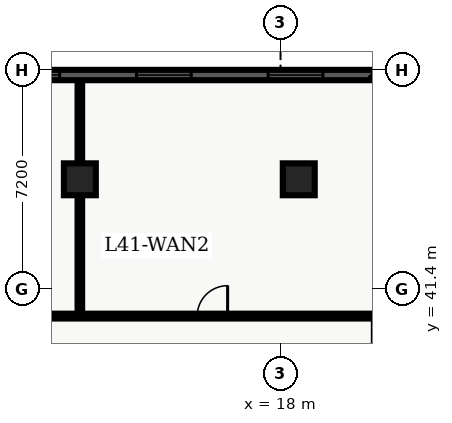
"""IFC4 building model, lengths in metres.
Left out: names, types, materials, properties, quantities, classifications, styles, units other than length and angle.
Written with IfcOpenShell. Run it as: python <this file> out.ifc"""

import sys

from ifc_helpers import new_model, entity, si_unit, converted_unit, direction, frame, origin_with_axes, origin_2d_with_axis, place, context, subcontext, project, spatial, polyline, rectangle, outline, extrude, element, fill, save


model = new_model("IFC4")
c1 = context("Model", 3, precision=1e-05, world=origin_with_axes(), true_north=direction((0.0, 1.0)))
c2 = subcontext(c1, "Body", "Model", "MODEL_VIEW")
j1 = project(units=[si_unit("LENGTHUNIT", "METRE"), converted_unit("PLANEANGLEUNIT", "DEGREE", entity("IfcPlaneAngleMeasure", 0.017), si_unit("PLANEANGLEUNIT", "RADIAN"), dimensions=[0, 0, 0, 0, 0, 0, 0])], contexts=[c1])
p1 = place(None, origin_with_axes())
s1 = spatial("IfcSite", under=j1, at=p1, CompositionType="ELEMENT")
p2 = place(p1, origin_with_axes())
s2 = spatial("IfcBuilding", under=s1, at=p2, CompositionType="ELEMENT")
p3 = place(p2, frame((0.0, 0.0, 168.0), z_axis=(0.0, 0.0, 1.0), x_axis=(1.0, 0.0, 0.0)))
s3 = spatial("IfcBuildingStorey", under=s2, at=p3, CompositionType="ELEMENT", Elevation=168.0)
for number, where, z_axis, x_axis in (
    (1, (11.4, 45.0, 0.0), (0.0, 0.0, 1.0), (1.0, 0.0, 0.0)),
    (2, (18.6, 45.0, 0.0), (0.0, 0.0, 1.0), (1.0, 0.0, 0.0)),
):
    element("IfcColumn", number, at=place(p3, frame(where, z_axis=z_axis, x_axis=x_axis)), inside=s3, PredefinedType="COLUMN", context=c2, shape_type="SweptSolid", body=[
        extrude(rectangle(XDim=1.05, YDim=1.05, at=origin_2d_with_axis()), origin_with_axes(), (0.0, 0.0, 1.0), 3.9),
    ])
p4 = place(p3, frame((2.6, 40.5, 0.0), z_axis=(0.0, 0.0, 1.0), x_axis=(1.0, 0.0, 0.0)))
e3 = element("IfcWall", 3, at=p4, inside=s3, PredefinedType="PARTITIONING", context=c2, shape_type="SweptSolid", body=[
    extrude(outline(polyline([(0.0, -0.08), (21.324, -0.08), (21.324, 0.08), (0.0, 0.08), (0.0, -0.08)])), origin_with_axes(), (0.0, 0.0, 1.0), 2.7),
])
p5 = place(p4, frame((4.395, 0.0, 0.0), z_axis=(0.0, 0.0, 1.0), x_axis=(1.0, 0.0, 0.0)))
e4 = element("IfcOpeningElement", 4, at=p5, cuts=e3, PredefinedType="OPENING", context=c2, shape_type="SweptSolid", body=[
    extrude(rectangle(XDim=1.2, YDim=0.18, at=origin_2d_with_axis()), origin_with_axes(), (0.0, 0.0, 1.0), 2.2),
])
p6 = place(p4, frame((13.16, 0.0, 0.0), z_axis=(0.0, 0.0, 1.0), x_axis=(1.0, 0.0, 0.0)))
e5 = element("IfcOpeningElement", 5, at=p6, cuts=e3, PredefinedType="OPENING", context=c2, shape_type="SweptSolid", body=[
    extrude(rectangle(XDim=1.0, YDim=0.18, at=origin_2d_with_axis()), origin_with_axes(), (0.0, 0.0, 1.0), 2.15),
])
p7 = place(p3, frame((11.4, 40.6, 0.0), z_axis=(0.0, 0.0, 1.0), x_axis=(0.0, 1.0, 0.0)))
e6 = element("IfcWall", 6, at=p7, inside=s3, PredefinedType="PARTITIONING", context=c2, shape_type="SweptSolid", body=[
    extrude(outline(polyline([(0.0, -0.075), (7.665, -0.075), (7.665, 0.075), (0.0, 0.075), (0.0, -0.075)])), origin_with_axes(), (0.0, 0.0, 1.0), 2.7),
])
p8 = place(p3, frame((2.74, 48.43, 0.0), z_axis=(0.0, 0.0, 1.0), x_axis=(1.0, 0.0, 0.0)))
e7 = element("IfcWall", 7, at=p8, inside=s3, PredefinedType="SOLIDWALL", context=c2, shape_type="SweptSolid", body=[
    extrude(outline(polyline([(0.0, -0.17), (18.519, -0.17), (18.519, 0.17), (0.0, 0.17), (0.0, -0.17)])), origin_with_axes(), (0.0, 0.0, 1.0), 3.66),
])
p9 = place(p8, frame((2.765, 0.0, 0.45), z_axis=(0.0, 0.0, 1.0), x_axis=(1.0, 0.0, 0.0)))
e8 = element("IfcOpeningElement", 8, at=p9, cuts=e7, PredefinedType="OPENING", context=c2, shape_type="SweptSolid", body=[
    extrude(rectangle(XDim=1.8, YDim=0.36, at=origin_2d_with_axis()), origin_with_axes(), (0.0, 0.0, 1.0), 2.1),
])
p10 = place(p8, frame((7.095, 0.0, 0.45), z_axis=(0.0, 0.0, 1.0), x_axis=(1.0, 0.0, 0.0)))
e9 = element("IfcOpeningElement", 9, at=p10, cuts=e7, PredefinedType="OPENING", context=c2, shape_type="SweptSolid", body=[
    extrude(rectangle(XDim=1.8, YDim=0.36, at=origin_2d_with_axis()), origin_with_axes(), (0.0, 0.0, 1.0), 2.1),
])
p11 = place(p8, frame((11.424, 0.0, 0.45), z_axis=(0.0, 0.0, 1.0), x_axis=(1.0, 0.0, 0.0)))
e10 = element("IfcOpeningElement", 10, at=p11, cuts=e7, PredefinedType="OPENING", context=c2, shape_type="SweptSolid", body=[
    extrude(rectangle(XDim=1.8, YDim=0.36, at=origin_2d_with_axis()), origin_with_axes(), (0.0, 0.0, 1.0), 2.1),
])
p12 = place(p8, frame((15.754, 0.0, 0.45), z_axis=(0.0, 0.0, 1.0), x_axis=(1.0, 0.0, 0.0)))
e11 = element("IfcOpeningElement", 11, at=p12, cuts=e7, PredefinedType="OPENING", context=c2, shape_type="SweptSolid", body=[
    extrude(rectangle(XDim=1.8, YDim=0.36, at=origin_2d_with_axis()), origin_with_axes(), (0.0, 0.0, 1.0), 2.1),
])
p13 = place(p3, frame((21.125, 48.494, 0.0), z_axis=(0.0, 0.0, 1.0), x_axis=(0.707107, -0.707107, 0.0)))
e12 = element("IfcWall", 12, at=p13, inside=s3, PredefinedType="SOLIDWALL", context=c2, shape_type="SweptSolid", body=[
    extrude(outline(polyline([(0.0, -0.17), (4.262, -0.17), (4.262, 0.17), (0.0, 0.17), (0.0, -0.17)])), origin_with_axes(), (0.0, 0.0, 1.0), 3.66),
])
p14 = place(p13, frame((2.131, 0.0, 0.45), z_axis=(0.0, 0.0, 1.0), x_axis=(1.0, 0.0, 0.0)))
e13 = element("IfcOpeningElement", 13, at=p14, cuts=e12, PredefinedType="OPENING", context=c2, shape_type="SweptSolid", body=[
    extrude(rectangle(XDim=1.8, YDim=0.36, at=origin_2d_with_axis()), origin_with_axes(), (0.0, 0.0, 1.0), 2.1),
])
p15 = place(p4, frame((13.16, 0.0, 0.0), z_axis=(0.0, 0.0, 1.0), x_axis=(1.0, 0.0, 0.0)))
e14 = element("IfcDoor", 14, at=p15, inside=s3, OperationType="SINGLE_SWING_RIGHT", PredefinedType="DOOR", context=c2, shape_type="SweptSolid", body=[
    extrude(rectangle(XDim=1.0, YDim=0.09, at=origin_2d_with_axis()), origin_with_axes(), (0.0, 0.0, 1.0), 2.15),
])
fill(e5, e14)
p16 = place(p8, frame((7.095, 0.0, 0.45), z_axis=(0.0, 0.0, 1.0), x_axis=(1.0, 0.0, 0.0)))
e15 = element("IfcWindow", 15, at=p16, inside=s3, PredefinedType="WINDOW", context=c2, shape_type="SweptSolid", body=[
    extrude(rectangle(XDim=1.8, YDim=0.09, at=origin_2d_with_axis()), origin_with_axes(), (0.0, 0.0, 1.0), 2.1),
])
fill(e9, e15)
p17 = place(p8, frame((11.424, 0.0, 0.45), z_axis=(0.0, 0.0, 1.0), x_axis=(1.0, 0.0, 0.0)))
e16 = element("IfcWindow", 16, at=p17, inside=s3, PredefinedType="WINDOW", context=c2, shape_type="SweptSolid", body=[
    extrude(rectangle(XDim=1.8, YDim=0.09, at=origin_2d_with_axis()), origin_with_axes(), (0.0, 0.0, 1.0), 2.1),
])
fill(e10, e16)
p18 = place(p8, frame((15.754, 0.0, 0.45), z_axis=(0.0, 0.0, 1.0), x_axis=(1.0, 0.0, 0.0)))
e17 = element("IfcWindow", 17, at=p18, inside=s3, PredefinedType="WINDOW", context=c2, shape_type="SweptSolid", body=[
    extrude(rectangle(XDim=1.8, YDim=0.09, at=origin_2d_with_axis()), origin_with_axes(), (0.0, 0.0, 1.0), 2.1),
])
fill(e11, e17)
save(model, sys.argv[1])
